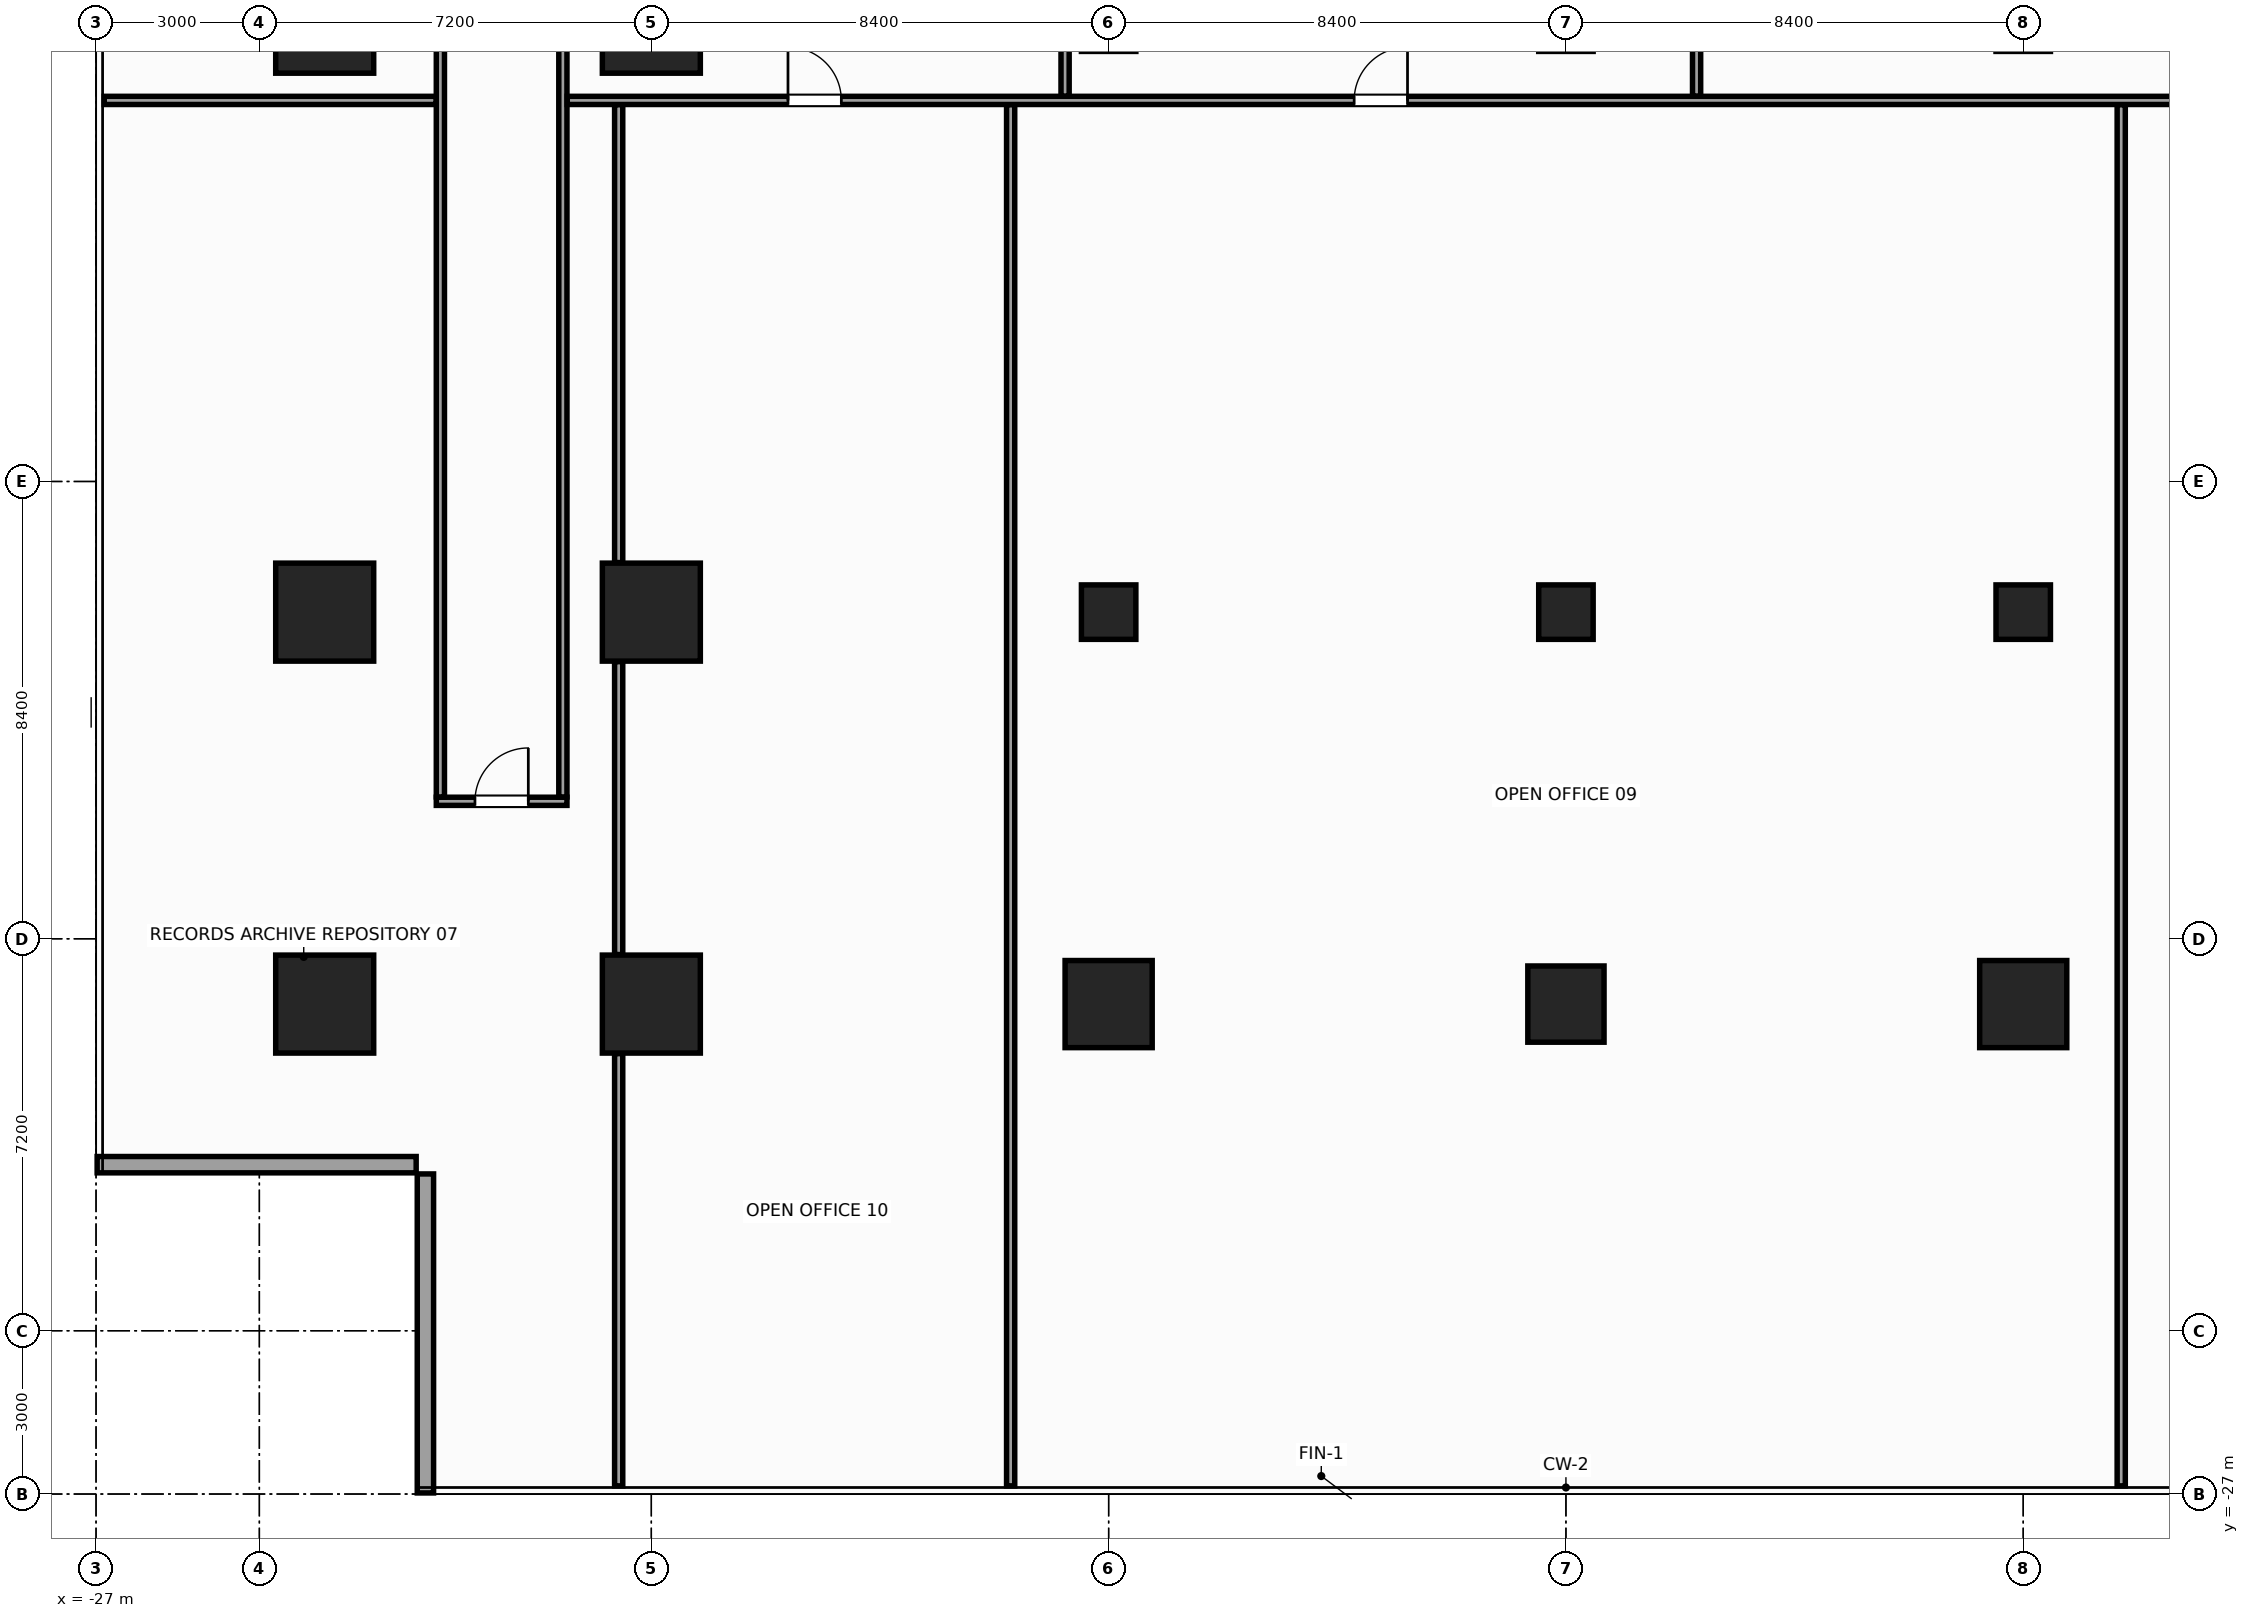
"""IFC4 building model, lengths in metres.
Left out: names, types, materials, properties, quantities, classifications, styles, units other than length and angle.
Written with IfcOpenShell. Run it as: python <this file> out.ifc"""

import sys

from ifc_helpers import new_model, si_unit, direction, frame, frame_2d, origin, origin_2d, place, context, subcontext, project, spatial, rectangle, hollow_rectangle, extrude, source, transform, mapped, element, fill, save


model = new_model("IFC4")
c1 = context("Model", 3, precision=1e-05, world=origin(), true_north=direction((0.0, 1.0)))
c2 = subcontext(c1, "Body", "Model", "MODEL_VIEW")
j1 = project(units=[si_unit("LENGTHUNIT", "METRE"), si_unit("PLANEANGLEUNIT", "RADIAN")], contexts=[c1])
p1 = place(None, origin())
s1 = spatial("IfcSite", under=j1, at=p1, CompositionType="ELEMENT")
p2 = place(p1, origin())
s2 = spatial("IfcBuilding", under=s1, at=p2, CompositionType="ELEMENT")
p3 = place(p2, frame((0.0, 0.0, 48.8)))
s3 = spatial("IfcBuildingStorey", under=s2, at=p3, CompositionType="ELEMENT", Elevation=48.8)
m1 = source(origin(), c2, "Body", "SweptSolid", [
    extrude(rectangle(XDim=1.8, YDim=1.8, at=origin_2d()), origin(), (0.0, 0.0, 1.0), 3.6),
])
for number, where, z_axis, x_axis in (
    (1, (-16.8, -18.0, 0.0), (0.0, 0.0, 1.0), (1.0, 0.0, 0.0)),
    (2, (-16.8, -10.8, 0.0), (0.0, 0.0, 1.0), (1.0, 0.0, 0.0)),
    (3, (-16.8, 0.0, 0.0), (0.0, 0.0, 1.0), (1.0, 0.0, 0.0)),
    (4, (-22.8, -18.0, 0.0), (0.0, 0.0, 1.0), (1.0, 0.0, 0.0)),
    (5, (-22.8, -10.8, 0.0), (0.0, 0.0, 1.0), (1.0, 0.0, 0.0)),
    (6, (-22.8, 0.0, 0.0), (0.0, 0.0, 1.0), (1.0, 0.0, 0.0)),
):
    element("IfcColumn", number, at=place(p3, frame(where, z_axis=z_axis, x_axis=x_axis)), inside=s3, PredefinedType="COLUMN", context=c2, shape_type="MappedRepresentation", body=[
        mapped(m1, transform((0.0, 0.0, 0.0), x_axis=(1.0, 0.0, 0.0), y_axis=(0.0, 1.0, 0.0), z_axis=(0.0, 0.0, 1.0), scale=1.0)),
    ])
m2 = source(origin(), c2, "Body", "SweptSolid", [
    extrude(rectangle(XDim=1.6, YDim=1.6, at=origin_2d()), origin(), (0.0, 0.0, 1.0), 3.6),
])
p4 = place(p3, frame((-8.4, -18.0, 0.0), z_axis=(0.0, 0.0, 1.0), x_axis=(1.0, 0.0, 0.0)))
e7 = element("IfcColumn", 7, at=p4, inside=s3, PredefinedType="COLUMN", context=c2, shape_type="MappedRepresentation", body=[
    mapped(m2, transform((0.0, 0.0, 0.0), x_axis=(1.0, 0.0, 0.0), y_axis=(0.0, 1.0, 0.0), z_axis=(0.0, 0.0, 1.0), scale=1.0)),
])
m3 = source(origin(), c2, "Body", "SweptSolid", [
    extrude(hollow_rectangle(XDim=1.0, YDim=1.0, WallThickness=0.045, at=origin_2d()), origin(), (0.0, 0.0, 1.0), 3.6),
])
p5 = place(p3, frame((-8.4, -10.8, 0.0), z_axis=(0.0, 0.0, 1.0), x_axis=(1.0, 0.0, 0.0)))
e8 = element("IfcColumn", 8, at=p5, inside=s3, PredefinedType="COLUMN", context=c2, shape_type="MappedRepresentation", body=[
    mapped(m3, transform((0.0, 0.0, 0.0), x_axis=(1.0, 0.0, 0.0), y_axis=(0.0, 1.0, 0.0), z_axis=(0.0, 0.0, 1.0), scale=1.0)),
])
p6 = place(p3, frame((8.4, -18.0, 0.0), z_axis=(0.0, 0.0, 1.0), x_axis=(1.0, 0.0, 0.0)))
e9 = element("IfcColumn", 9, at=p6, inside=s3, PredefinedType="COLUMN", context=c2, shape_type="MappedRepresentation", body=[
    mapped(m2, transform((0.0, 0.0, 0.0), x_axis=(1.0, 0.0, 0.0), y_axis=(0.0, 1.0, 0.0), z_axis=(0.0, 0.0, 1.0), scale=1.0)),
])
p7 = place(p3, frame((8.4, -10.8, 0.0), z_axis=(0.0, 0.0, 1.0), x_axis=(1.0, 0.0, 0.0)))
e10 = element("IfcColumn", 10, at=p7, inside=s3, PredefinedType="COLUMN", context=c2, shape_type="MappedRepresentation", body=[
    mapped(m3, transform((0.0, 0.0, 0.0), x_axis=(1.0, 0.0, 0.0), y_axis=(0.0, 1.0, 0.0), z_axis=(0.0, 0.0, 1.0), scale=1.0)),
])
m4 = source(origin(), c2, "Body", "SweptSolid", [
    extrude(rectangle(XDim=1.4, YDim=1.4, at=origin_2d()), origin(), (0.0, 0.0, 1.0), 3.6),
])
p8 = place(p3, frame((0.0, -18.0, 0.0), z_axis=(0.0, 0.0, 1.0), x_axis=(1.0, 0.0, 0.0)))
e11 = element("IfcColumn", 11, at=p8, inside=s3, PredefinedType="COLUMN", context=c2, shape_type="MappedRepresentation", body=[
    mapped(m4, transform((0.0, 0.0, 0.0), x_axis=(1.0, 0.0, 0.0), y_axis=(0.0, 1.0, 0.0), z_axis=(0.0, 0.0, 1.0), scale=1.0)),
])
m5 = source(origin(), c2, "Body", "SweptSolid", [
    extrude(rectangle(XDim=1.0, YDim=1.0, at=origin_2d()), origin(), (0.0, 0.0, 1.0), 3.6),
])
p9 = place(p3, frame((0.0, -10.8, 0.0), z_axis=(0.0, 0.0, 1.0), x_axis=(1.0, 0.0, 0.0)))
e12 = element("IfcColumn", 12, at=p9, inside=s3, PredefinedType="COLUMN", context=c2, shape_type="MappedRepresentation", body=[
    mapped(m5, transform((0.0, 0.0, 0.0), x_axis=(1.0, 0.0, 0.0), y_axis=(0.0, 1.0, 0.0), z_axis=(0.0, 0.0, 1.0), scale=1.0)),
])
m6 = source(origin(), c2, "Body", "SweptSolid", [
    extrude(rectangle(XDim=5.86, YDim=0.3, at=frame_2d((2.93, 0.0))), origin(), (0.0, 0.0, 1.0), 2.74),
])
for number, where, z_axis, x_axis in (
    (13, (-26.98, -20.95, 0.0), (0.0, 0.0, 1.0), (1.0, 0.0, 0.0)),
    (14, (-20.95, -21.12, 0.0), (0.0, 0.0, 1.0), (0.0, -1.0, 0.0)),
):
    element("IfcWall", number, at=place(p3, frame(where, z_axis=z_axis, x_axis=x_axis)), inside=s3, PredefinedType="STANDARD", context=c2, shape_type="MappedRepresentation", body=[
        mapped(m6, transform((0.0, 0.0, 0.0), x_axis=(1.0, 0.0, 0.0), y_axis=(0.0, 1.0, 0.0), z_axis=(0.0, 0.0, 1.0), scale=1.0)),
    ])
m7 = source(origin(), c2, "Body", "SweptSolid", [
    extrude(rectangle(XDim=2.4, YDim=0.15, at=frame_2d((1.2, 0.0))), origin(), (0.0, 0.0, 1.0), 2.945),
])
p10 = place(p3, frame((-20.75, -14.275, 0.0), z_axis=(0.0, 0.0, 1.0), x_axis=(1.0, 0.0, 0.0)))
e15 = element("IfcWall", 15, at=p10, inside=s3, PredefinedType="PARTITIONING", context=c2, shape_type="MappedRepresentation", body=[
    mapped(m7, transform((0.0, 0.0, 0.0), x_axis=(1.0, 0.0, 0.0), y_axis=(0.0, 1.0, 0.0), z_axis=(0.0, 0.0, 1.0), scale=1.0)),
])
p11 = place(p10, frame((0.71, 0.0, 0.0)))
e16 = element("IfcOpeningElement", 16, at=p11, cuts=e15, PredefinedType="OPENING", context=c2, shape_type="SweptSolid", body=[
    extrude(rectangle(XDim=0.98, YDim=2.15, at=frame_2d((0.49, 1.075))), frame((0.0, 0.087, 0.0), z_axis=(0.0, -1.0, 0.0), x_axis=(1.0, 0.0, 0.0)), (0.0, 0.0, 1.0), 0.174),
])
m8 = source(origin(), c2, "Body", "SweptSolid", [
    extrude(rectangle(XDim=24.115, YDim=0.15, at=frame_2d((12.058, 0.0))), origin(), (0.0, 0.0, 1.0), 2.745),
])
p12 = place(p3, frame((-20.675, -14.195, 0.0), z_axis=(0.0, 0.0, 1.0), x_axis=(0.0, 1.0, 0.0)))
e17 = element("IfcWall", 17, at=p12, inside=s3, PredefinedType="PARTITIONING", context=c2, shape_type="MappedRepresentation", body=[
    mapped(m8, transform((0.0, 0.0, 0.0), x_axis=(1.0, 0.0, 0.0), y_axis=(0.0, 1.0, 0.0), z_axis=(0.0, 0.0, 1.0), scale=1.0)),
])
p13 = place(p12, frame((17.942, 0.0, 0.0)))
e18 = element("IfcOpeningElement", 18, at=p13, cuts=e17, PredefinedType="OPENING", context=c2, shape_type="SweptSolid", body=[
    extrude(rectangle(XDim=0.98, YDim=2.15, at=frame_2d((0.49, 1.075))), frame((0.0, 0.087, 0.0), z_axis=(0.0, -1.0, 0.0), x_axis=(1.0, 0.0, 0.0)), (0.0, 0.0, 1.0), 0.174),
])
m9 = source(origin(), c2, "Body", "SweptSolid", [
    extrude(rectangle(XDim=21.995, YDim=0.15, at=frame_2d((10.998, 0.0))), origin(), (0.0, 0.0, 1.0), 2.745),
])
p14 = place(p3, frame((-18.425, -14.195, 0.0), z_axis=(0.0, 0.0, 1.0), x_axis=(0.0, 1.0, 0.0)))
e19 = element("IfcWall", 19, at=p14, inside=s3, PredefinedType="PARTITIONING", context=c2, shape_type="MappedRepresentation", body=[
    mapped(m9, transform((0.0, 0.0, 0.0), x_axis=(1.0, 0.0, 0.0), y_axis=(0.0, 1.0, 0.0), z_axis=(0.0, 0.0, 1.0), scale=1.0)),
])
m10 = source(origin(), c2, "Body", "SweptSolid", [
    extrude(rectangle(XDim=6.095, YDim=0.15, at=frame_2d((3.048, 0.0))), origin(), (0.0, 0.0, 1.0), 2.745),
])
p15 = place(p3, frame((-26.85, -1.4, 0.0), z_axis=(0.0, 0.0, 1.0), x_axis=(1.0, 0.0, 0.0)))
e20 = element("IfcWall", 20, at=p15, inside=s3, PredefinedType="PARTITIONING", context=c2, shape_type="MappedRepresentation", body=[
    mapped(m10, transform((0.0, 0.0, 0.0), x_axis=(1.0, 0.0, 0.0), y_axis=(0.0, 1.0, 0.0), z_axis=(0.0, 0.0, 1.0), scale=1.0)),
])
m11 = source(origin(), c2, "Body", "SweptSolid", [
    extrude(rectangle(XDim=36.69, YDim=0.15, at=frame_2d((18.345, 0.0))), origin(), (0.0, 0.0, 1.0), 2.745),
])
p16 = place(p3, frame((-18.345, -1.4, 0.0), z_axis=(0.0, 0.0, 1.0), x_axis=(1.0, 0.0, 0.0)))
e21 = element("IfcWall", 21, at=p16, inside=s3, PredefinedType="PARTITIONING", context=c2, shape_type="MappedRepresentation", body=[
    mapped(m11, transform((0.0, 0.0, 0.0), x_axis=(1.0, 0.0, 0.0), y_axis=(0.0, 1.0, 0.0), z_axis=(0.0, 0.0, 1.0), scale=1.0)),
])
p17 = place(p16, frame((14.455, 0.0, 0.0)))
e22 = element("IfcOpeningElement", 22, at=p17, cuts=e21, PredefinedType="OPENING", context=c2, shape_type="SweptSolid", body=[
    extrude(rectangle(XDim=0.98, YDim=2.15, at=frame_2d((0.49, 1.075))), frame((0.0, 0.087, 0.0), z_axis=(0.0, -1.0, 0.0), x_axis=(1.0, 0.0, 0.0)), (0.0, 0.0, 1.0), 0.174),
])
p18 = place(p16, frame((4.055, 0.0, 0.0)))
e23 = element("IfcOpeningElement", 23, at=p18, cuts=e21, PredefinedType="OPENING", context=c2, shape_type="SweptSolid", body=[
    extrude(rectangle(XDim=0.98, YDim=2.15, at=frame_2d((0.49, 1.075))), frame((0.0, 0.087, 0.0), z_axis=(0.0, -1.0, 0.0), x_axis=(1.0, 0.0, 0.0)), (0.0, 0.0, 1.0), 0.174),
])
p19 = place(p16, frame((32.415, 0.0, 0.0)))
e24 = element("IfcOpeningElement", 24, at=p19, cuts=e21, PredefinedType="OPENING", context=c2, shape_type="SweptSolid", body=[
    extrude(rectangle(XDim=0.98, YDim=2.15, at=frame_2d((0.49, 1.075))), frame((0.0, 0.087, 0.0), z_axis=(0.0, -1.0, 0.0), x_axis=(1.0, 0.0, 0.0)), (0.0, 0.0, 1.0), 0.174),
])
m12 = source(origin(), c2, "Body", "SweptSolid", [
    extrude(rectangle(XDim=8.965, YDim=0.15, at=frame_2d((4.482, 0.0))), origin(), (0.0, 0.0, 1.0), 2.645),
])
for number, where, z_axis, x_axis in (
    (25, (-9.2, -1.32, 0.0), (0.0, 0.0, 1.0), (0.0, 1.0, 0.0)),
    (26, (2.4, -1.32, 0.0), (0.0, 0.0, 1.0), (0.0, 1.0, 0.0)),
):
    element("IfcWall", number, at=place(p3, frame(where, z_axis=z_axis, x_axis=x_axis)), inside=s3, PredefinedType="PARTITIONING", context=c2, shape_type="MappedRepresentation", body=[
        mapped(m12, transform((0.0, 0.0, 0.0), x_axis=(1.0, 0.0, 0.0), y_axis=(0.0, 1.0, 0.0), z_axis=(0.0, 0.0, 1.0), scale=1.0)),
    ])
m13 = source(origin(), c2, "Body", "SweptSolid", [
    extrude(rectangle(XDim=7.94, YDim=0.15, at=frame_2d((3.97, 0.0))), origin(), (0.0, 0.0, 1.0), 3.36),
])
p20 = place(p3, frame((-17.4, -26.85, 0.0), z_axis=(0.0, 0.0, 1.0), x_axis=(0.0, 1.0, 0.0)))
e27 = element("IfcWall", 27, at=p20, inside=s3, PredefinedType="PARTITIONING", context=c2, shape_type="MappedRepresentation", body=[
    mapped(m13, transform((0.0, 0.0, 0.0), x_axis=(1.0, 0.0, 0.0), y_axis=(0.0, 1.0, 0.0), z_axis=(0.0, 0.0, 1.0), scale=1.0)),
])
m14 = source(origin(), c2, "Body", "SweptSolid", [
    extrude(rectangle(XDim=5.38, YDim=0.15, at=frame_2d((2.69, 0.0))), origin(), (0.0, 0.0, 1.0), 3.36),
])
p21 = place(p3, frame((-17.4, -17.09, 0.0), z_axis=(0.0, 0.0, 1.0), x_axis=(0.0, 1.0, 0.0)))
e28 = element("IfcWall", 28, at=p21, inside=s3, PredefinedType="PARTITIONING", context=c2, shape_type="MappedRepresentation", body=[
    mapped(m14, transform((0.0, 0.0, 0.0), x_axis=(1.0, 0.0, 0.0), y_axis=(0.0, 1.0, 0.0), z_axis=(0.0, 0.0, 1.0), scale=1.0)),
])
m15 = source(origin(), c2, "Body", "SweptSolid", [
    extrude(rectangle(XDim=8.41, YDim=0.15, at=frame_2d((4.205, 0.0))), origin(), (0.0, 0.0, 1.0), 3.36),
])
p22 = place(p3, frame((-17.4, -9.89, 0.0), z_axis=(0.0, 0.0, 1.0), x_axis=(0.0, 1.0, 0.0)))
e29 = element("IfcWall", 29, at=p22, inside=s3, PredefinedType="PARTITIONING", context=c2, shape_type="MappedRepresentation", body=[
    mapped(m15, transform((0.0, 0.0, 0.0), x_axis=(1.0, 0.0, 0.0), y_axis=(0.0, 1.0, 0.0), z_axis=(0.0, 0.0, 1.0), scale=1.0)),
])
m16 = source(origin(), c2, "Body", "SweptSolid", [
    extrude(rectangle(XDim=25.37, YDim=0.15, at=frame_2d((12.685, 0.0))), origin(), (0.0, 0.0, 1.0), 2.745),
])
for number, where, z_axis, x_axis in (
    (30, (-10.2, -26.85, 0.0), (0.0, 0.0, 1.0), (0.0, 1.0, 0.0)),
    (31, (10.2, -26.85, 0.0), (0.0, 0.0, 1.0), (0.0, 1.0, 0.0)),
):
    element("IfcWall", number, at=place(p3, frame(where, z_axis=z_axis, x_axis=x_axis)), inside=s3, PredefinedType="PARTITIONING", context=c2, shape_type="MappedRepresentation", body=[
        mapped(m16, transform((0.0, 0.0, 0.0), x_axis=(1.0, 0.0, 0.0), y_axis=(0.0, 1.0, 0.0), z_axis=(0.0, 0.0, 1.0), scale=1.0)),
    ])
m17 = source(origin(), c2, "Body", "SweptSolid", [
    extrude(rectangle(XDim=0.98, YDim=2.15, at=frame_2d((0.49, 1.075))), frame((0.0, 0.025, 0.0), z_axis=(0.0, -1.0, 0.0), x_axis=(1.0, 0.0, 0.0)), (0.0, 0.0, 1.0), 0.05),
])
p23 = place(p11, origin())
e32 = element("IfcDoor", 32, at=p23, inside=s3, OperationType="SINGLE_SWING_RIGHT", PredefinedType="DOOR", context=c2, shape_type="MappedRepresentation", body=[
    mapped(m17, transform((0.0, 0.0, 0.0), x_axis=(1.0, 0.0, 0.0), y_axis=(0.0, 1.0, 0.0), z_axis=(0.0, 0.0, 1.0), scale=1.0)),
])
fill(e16, e32)
p24 = place(p17, origin())
e33 = element("IfcDoor", 33, at=p24, inside=s3, OperationType="SINGLE_SWING_RIGHT", PredefinedType="DOOR", context=c2, shape_type="MappedRepresentation", body=[
    mapped(m17, transform((0.0, 0.0, 0.0), x_axis=(1.0, 0.0, 0.0), y_axis=(0.0, 1.0, 0.0), z_axis=(0.0, 0.0, 1.0), scale=1.0)),
])
fill(e22, e33)
p25 = place(p18, origin())
e34 = element("IfcDoor", 34, at=p25, inside=s3, OperationType="SINGLE_SWING_LEFT", PredefinedType="DOOR", context=c2, shape_type="MappedRepresentation", body=[
    mapped(m17, transform((0.0, 0.0, 0.0), x_axis=(1.0, 0.0, 0.0), y_axis=(0.0, 1.0, 0.0), z_axis=(0.0, 0.0, 1.0), scale=1.0)),
])
fill(e23, e34)
save(model, sys.argv[1])
